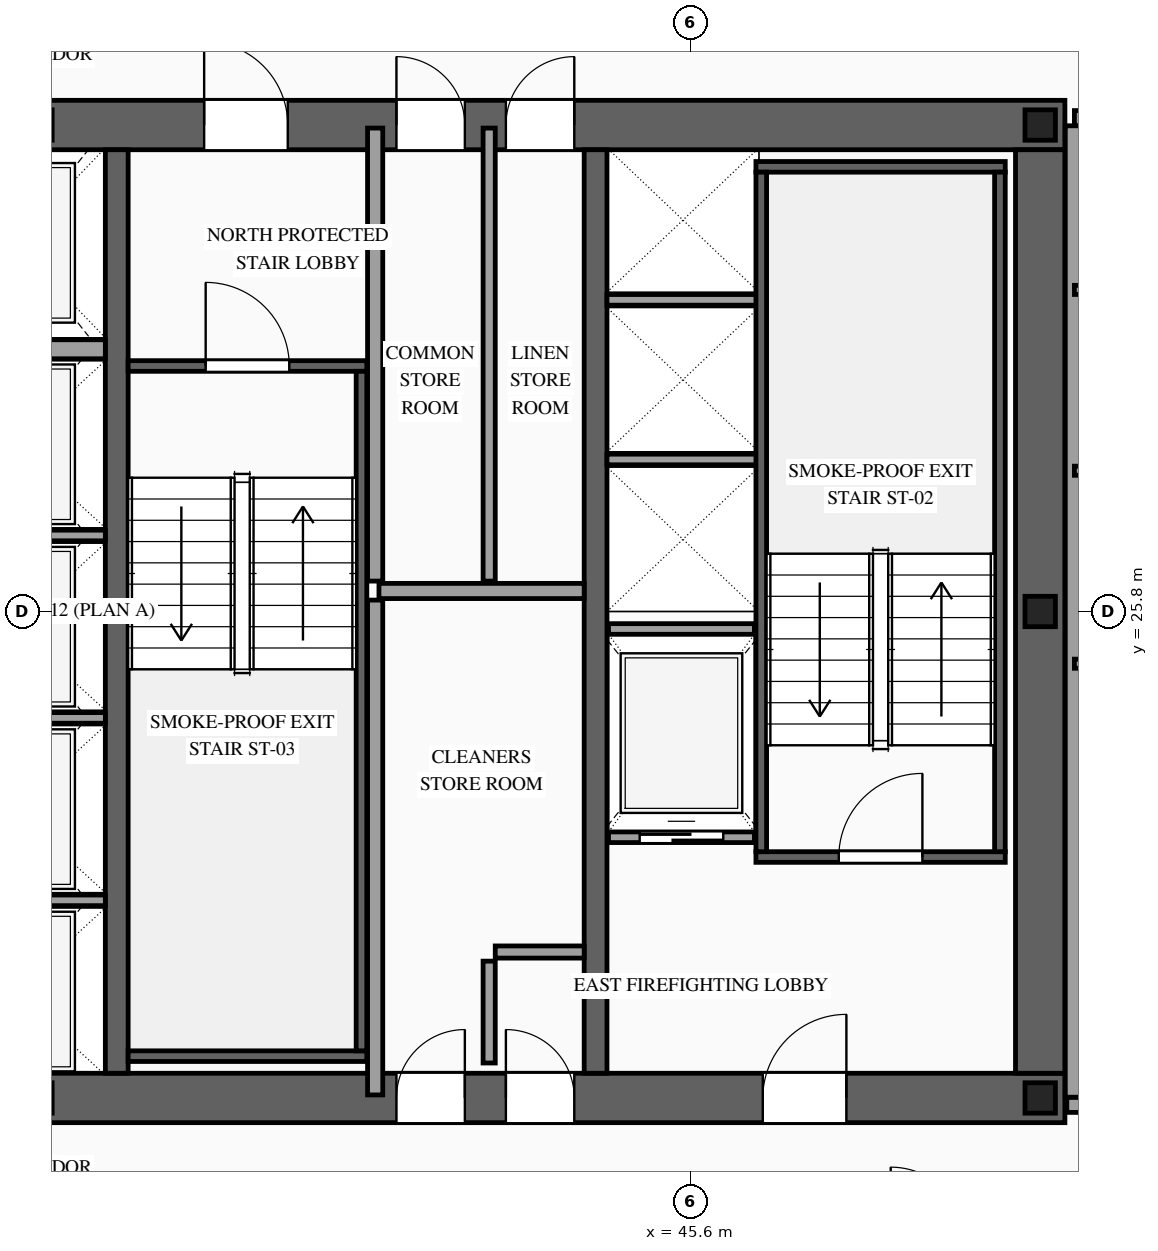
"""IFC4 building model, lengths in metres.
Left out: names, types, materials, properties, quantities, classifications, styles, units other than length and angle.
Written with IfcOpenShell. Run it as: python <this file> out.ifc"""

import sys

from ifc_helpers import new_model, si_unit, direction, frame, frame_2d, origin, origin_2d, place, context, subcontext, project, spatial, rectangle, i_section, extrude, source, transform, mapped, element, fill, save


model = new_model("IFC4")
c1 = context("Model", 3, precision=1e-05, world=origin(), true_north=direction((0.0, 1.0)))
c2 = subcontext(c1, "Body", "Model", "MODEL_VIEW")
j1 = project(units=[si_unit("LENGTHUNIT", "METRE"), si_unit("PLANEANGLEUNIT", "RADIAN")], contexts=[c1])
p1 = place(None, origin())
s1 = spatial("IfcSite", under=j1, at=p1, CompositionType="ELEMENT")
p2 = place(p1, origin())
s2 = spatial("IfcBuilding", under=s1, at=p2, CompositionType="ELEMENT")
p3 = place(p2, frame((0.0, 0.0, 195.0)))
s3 = spatial("IfcBuildingStorey", under=s2, at=p3, CompositionType="ELEMENT", Elevation=195.0)
p4 = place(p3, frame((23.475, 19.4, 0.0), z_axis=(0.0, 0.0, 1.0), x_axis=(1.0, 0.0, 0.0)))
e1 = element("IfcWall", 1, at=p4, inside=s3, PredefinedType="SHEAR", context=c2, shape_type="SweptSolid", body=[
    extrude(rectangle(XDim=27.05, YDim=0.65, at=frame_2d((13.525, 0.0))), origin(), (0.0, 0.0, 1.0), 3.5),
])
p5 = place(p4, frame((1.975, 0.0, 0.0)))
e2 = element("IfcOpeningElement", 2, at=p5, cuts=e1, PredefinedType="OPENING", context=c2, shape_type="SweptSolid", body=[
    extrude(rectangle(XDim=1.1, YDim=2.2, at=frame_2d((0.55, 1.1))), frame((0.0, 0.34, 0.0), z_axis=(0.0, -1.0, 0.0), x_axis=(1.0, 0.0, 0.0)), (0.0, 0.0, 1.0), 0.68),
])
p6 = place(p4, frame((9.875, 0.0, 0.0)))
e3 = element("IfcOpeningElement", 3, at=p6, cuts=e1, PredefinedType="OPENING", context=c2, shape_type="SweptSolid", body=[
    extrude(rectangle(XDim=1.1, YDim=2.2, at=frame_2d((0.55, 1.1))), frame((0.0, 0.34, 0.0), z_axis=(0.0, -1.0, 0.0), x_axis=(1.0, 0.0, 0.0)), (0.0, 0.0, 1.0), 0.68),
])
p7 = place(p4, frame((23.075, 0.0, 0.0)))
e4 = element("IfcOpeningElement", 4, at=p7, cuts=e1, PredefinedType="OPENING", context=c2, shape_type="SweptSolid", body=[
    extrude(rectangle(XDim=1.1, YDim=2.2, at=frame_2d((0.55, 1.1))), frame((0.0, 0.34, 0.0), z_axis=(0.0, -1.0, 0.0), x_axis=(1.0, 0.0, 0.0)), (0.0, 0.0, 1.0), 0.68),
])
p8 = place(p4, frame((19.695, 0.0, 0.0)))
e5 = element("IfcOpeningElement", 5, at=p8, cuts=e1, PredefinedType="OPENING", context=c2, shape_type="SweptSolid", body=[
    extrude(rectangle(XDim=0.9, YDim=2.15, at=frame_2d((0.45, 1.075))), frame((0.0, 0.34, 0.0), z_axis=(0.0, -1.0, 0.0), x_axis=(1.0, 0.0, 0.0)), (0.0, 0.0, 1.0), 0.68),
])
p9 = place(p4, frame((18.255, 0.0, 0.0)))
e6 = element("IfcOpeningElement", 6, at=p9, cuts=e1, PredefinedType="OPENING", context=c2, shape_type="SweptSolid", body=[
    extrude(rectangle(XDim=0.9, YDim=2.15, at=frame_2d((0.45, 1.075))), frame((0.0, 0.34, 0.0), z_axis=(0.0, -1.0, 0.0), x_axis=(1.0, 0.0, 0.0)), (0.0, 0.0, 1.0), 0.68),
])
p10 = place(p3, frame((23.475, 32.2, 0.0), z_axis=(0.0, 0.0, 1.0), x_axis=(1.0, 0.0, 0.0)))
e7 = element("IfcWall", 7, at=p10, inside=s3, PredefinedType="SHEAR", context=c2, shape_type="SweptSolid", body=[
    extrude(rectangle(XDim=27.05, YDim=0.65, at=frame_2d((13.525, 0.0))), origin(), (0.0, 0.0, 1.0), 3.5),
])
p11 = place(p10, frame((4.595, 0.0, 0.0)))
e8 = element("IfcOpeningElement", 8, at=p11, cuts=e7, PredefinedType="OPENING", context=c2, shape_type="SweptSolid", body=[
    extrude(rectangle(XDim=0.9, YDim=2.15, at=frame_2d((0.45, 1.075))), frame((0.0, 0.34, 0.0), z_axis=(0.0, -1.0, 0.0), x_axis=(1.0, 0.0, 0.0)), (0.0, 0.0, 1.0), 0.68),
])
p12 = place(p10, frame((9.875, 0.0, 0.0)))
e9 = element("IfcOpeningElement", 9, at=p12, cuts=e7, PredefinedType="OPENING", context=c2, shape_type="SweptSolid", body=[
    extrude(rectangle(XDim=1.1, YDim=2.2, at=frame_2d((0.55, 1.1))), frame((0.0, 0.34, 0.0), z_axis=(0.0, -1.0, 0.0), x_axis=(1.0, 0.0, 0.0)), (0.0, 0.0, 1.0), 0.68),
])
p13 = place(p10, frame((15.725, 0.0, 0.0)))
e10 = element("IfcOpeningElement", 10, at=p13, cuts=e7, PredefinedType="OPENING", context=c2, shape_type="SweptSolid", body=[
    extrude(rectangle(XDim=1.1, YDim=2.2, at=frame_2d((0.55, 1.1))), frame((0.0, 0.34, 0.0), z_axis=(0.0, -1.0, 0.0), x_axis=(1.0, 0.0, 0.0)), (0.0, 0.0, 1.0), 0.68),
])
p14 = place(p10, frame((18.255, 0.0, 0.0)))
e11 = element("IfcOpeningElement", 11, at=p14, cuts=e7, PredefinedType="OPENING", context=c2, shape_type="SweptSolid", body=[
    extrude(rectangle(XDim=0.9, YDim=2.15, at=frame_2d((0.45, 1.075))), frame((0.0, 0.34, 0.0), z_axis=(0.0, -1.0, 0.0), x_axis=(1.0, 0.0, 0.0)), (0.0, 0.0, 1.0), 0.68),
])
p15 = place(p10, frame((19.695, 0.0, 0.0)))
e12 = element("IfcOpeningElement", 12, at=p15, cuts=e7, PredefinedType="OPENING", context=c2, shape_type="SweptSolid", body=[
    extrude(rectangle(XDim=0.9, YDim=2.15, at=frame_2d((0.45, 1.075))), frame((0.0, 0.34, 0.0), z_axis=(0.0, -1.0, 0.0), x_axis=(1.0, 0.0, 0.0)), (0.0, 0.0, 1.0), 0.68),
])
m1 = source(origin(), c2, "Body", "SweptSolid", [
    extrude(rectangle(XDim=12.15, YDim=0.65, at=frame_2d((6.075, 0.0))), origin(), (0.0, 0.0, 1.0), 3.5),
])
p16 = place(p3, frame((50.2, 19.725, 0.0), z_axis=(0.0, 0.0, 1.0), x_axis=(0.0, 1.0, 0.0)))
e13 = element("IfcWall", 13, at=p16, inside=s3, PredefinedType="SHEAR", context=c2, shape_type="MappedRepresentation", body=[
    mapped(m1, transform((0.0, 0.0, 0.0), scale=1.0)),
])
m2 = source(origin(), c2, "Body", "SweptSolid", [
    extrude(rectangle(XDim=12.15, YDim=0.3, at=frame_2d((6.075, 0.0))), origin(), (0.0, 0.0, 1.0), 3.5),
])
for number, where, z_axis, x_axis in (
    (14, (38.05, 19.725, 0.0), (0.0, 0.0, 1.0), (0.0, 1.0, 0.0)),
    (15, (44.35, 19.725, 0.0), (0.0, 0.0, 1.0), (0.0, 1.0, 0.0)),
):
    element("IfcWall", number, at=place(p3, frame(where, z_axis=z_axis, x_axis=x_axis)), inside=s3, PredefinedType="SOLIDWALL", context=c2, shape_type="MappedRepresentation", body=[
        mapped(m2, transform((0.0, 0.0, 0.0), scale=1.0)),
    ])
m3 = source(origin(), c2, "Body", "SweptSolid", [
    extrude(i_section(OverallWidth=0.4, OverallDepth=0.4, WebThickness=0.013, FlangeThickness=0.021, at=origin_2d()), origin(), (0.0, 0.0, 1.0), 3.5),
])
for number, where, z_axis, x_axis in (
    (16, (50.2, 19.4, 0.0), (0.0, 0.0, 1.0), (1.0, 0.0, 0.0)),
    (17, (50.2, 25.8, 0.0), (0.0, 0.0, 1.0), (1.0, 0.0, 0.0)),
    (18, (50.2, 32.2, 0.0), (0.0, 0.0, 1.0), (1.0, 0.0, 0.0)),
):
    element("IfcColumn", number, at=place(p3, frame(where, z_axis=z_axis, x_axis=x_axis)), inside=s3, PredefinedType="COLUMN", context=c2, shape_type="MappedRepresentation", body=[
        mapped(m3, transform((0.0, 0.0, 0.0), scale=1.0)),
    ])
p17 = place(p3, frame((44.52, 22.83, 0.0), z_axis=(0.0, 0.0, 1.0), x_axis=(1.0, 0.0, 0.0)))
e19 = element("IfcWall", 19, at=p17, inside=s3, PredefinedType="SOLIDWALL", context=c2, shape_type="SweptSolid", body=[
    extrude(rectangle(XDim=1.92, YDim=0.14, at=frame_2d((0.96, 0.0))), origin(), (0.0, 0.0, 1.0), 3.28),
])
p18 = place(p17, frame((0.41, 0.0, 0.0)))
e20 = element("IfcOpeningElement", 20, at=p18, cuts=e19, PredefinedType="OPENING", context=c2, shape_type="SweptSolid", body=[
    extrude(rectangle(XDim=1.1, YDim=2.2, at=frame_2d((0.55, 1.1))), frame((0.0, 0.085, 0.0), z_axis=(0.0, -1.0, 0.0), x_axis=(1.0, 0.0, 0.0)), (0.0, 0.0, 1.0), 0.17),
])
m4 = source(origin(), c2, "Body", "SweptSolid", [
    extrude(rectangle(XDim=1.92, YDim=0.14, at=frame_2d((0.96, 0.0))), origin(), (0.0, 0.0, 1.0), 3.28),
])
p19 = place(p3, frame((44.52, 25.57, 0.0), z_axis=(0.0, 0.0, 1.0), x_axis=(1.0, 0.0, 0.0)))
e21 = element("IfcWall", 21, at=p19, inside=s3, PredefinedType="SOLIDWALL", context=c2, shape_type="MappedRepresentation", body=[
    mapped(m4, transform((0.0, 0.0, 0.0), scale=1.0)),
])
m5 = source(origin(), c2, "Body", "SweptSolid", [
    extrude(rectangle(XDim=2.4, YDim=0.14, at=frame_2d((1.2, 0.0))), origin(), (0.0, 0.0, 1.0), 3.28),
])
for number, where, z_axis, x_axis in (
    (22, (35.5, 22.0, 0.0), (0.0, 0.0, 1.0), (1.0, 0.0, 0.0)),
    (23, (35.5, 24.4, 0.0), (0.0, 0.0, 1.0), (1.0, 0.0, 0.0)),
    (24, (35.5, 26.8, 0.0), (0.0, 0.0, 1.0), (1.0, 0.0, 0.0)),
):
    element("IfcWall", number, at=place(p3, frame(where, z_axis=z_axis, x_axis=x_axis)), inside=s3, PredefinedType="SOLIDWALL", context=c2, shape_type="MappedRepresentation", body=[
        mapped(m5, transform((0.0, 0.0, 0.0), scale=1.0)),
    ])
m6 = source(origin(), c2, "Body", "SweptSolid", [
    extrude(rectangle(XDim=2.4, YDim=0.25, at=frame_2d((1.2, 0.0))), origin(), (0.0, 0.0, 1.0), 3.28),
])
p20 = place(p3, frame((35.5, 29.25, 0.0), z_axis=(0.0, 0.0, 1.0), x_axis=(1.0, 0.0, 0.0)))
e25 = element("IfcWall", 25, at=p20, inside=s3, PredefinedType="SOLIDWALL", context=c2, shape_type="MappedRepresentation", body=[
    mapped(m6, transform((0.0, 0.0, 0.0), scale=1.0)),
])
m7 = source(origin(), c2, "Body", "SweptSolid", [
    extrude(rectangle(XDim=2.0, YDim=0.14, at=frame_2d((1.0, 0.0))), origin(), (0.0, 0.0, 1.0), 3.28),
])
for number, where, z_axis, x_axis in (
    (26, (44.5, 27.8, 0.0), (0.0, 0.0, 1.0), (1.0, 0.0, 0.0)),
    (27, (44.5, 29.9, 0.0), (0.0, 0.0, 1.0), (1.0, 0.0, 0.0)),
):
    element("IfcWall", number, at=place(p3, frame(where, z_axis=z_axis, x_axis=x_axis)), inside=s3, PredefinedType="SOLIDWALL", context=c2, shape_type="MappedRepresentation", body=[
        mapped(m7, transform((0.0, 0.0, 0.0), scale=1.0)),
    ])
p21 = place(p3, frame((46.46, 22.57, 0.0), z_axis=(0.0, 0.0, 1.0), x_axis=(1.0, 0.0, 0.0)))
e28 = element("IfcWall", 28, at=p21, inside=s3, PredefinedType="SOLIDWALL", context=c2, shape_type="SweptSolid", body=[
    extrude(rectangle(XDim=3.28, YDim=0.14, at=frame_2d((1.64, 0.0))), origin(), (0.0, 0.0, 1.0), 3.28),
])
p22 = place(p21, frame((1.09, 0.0, 0.0)))
e29 = element("IfcOpeningElement", 29, at=p22, cuts=e28, PredefinedType="OPENING", context=c2, shape_type="SweptSolid", body=[
    extrude(rectangle(XDim=1.1, YDim=2.2, at=frame_2d((0.55, 1.1))), frame((0.0, 0.085, 0.0), z_axis=(0.0, -1.0, 0.0), x_axis=(1.0, 0.0, 0.0)), (0.0, 0.0, 1.0), 0.17),
])
m8 = source(origin(), c2, "Body", "SweptSolid", [
    extrude(rectangle(XDim=3.28, YDim=0.14, at=frame_2d((1.64, 0.0))), origin(), (0.0, 0.0, 1.0), 3.28),
])
p23 = place(p3, frame((46.46, 31.65, 0.0), z_axis=(0.0, 0.0, 1.0), x_axis=(1.0, 0.0, 0.0)))
e30 = element("IfcWall", 30, at=p23, inside=s3, PredefinedType="SOLIDWALL", context=c2, shape_type="MappedRepresentation", body=[
    mapped(m8, transform((0.0, 0.0, 0.0), scale=1.0)),
])
m9 = source(origin(), c2, "Body", "SweptSolid", [
    extrude(rectangle(XDim=8.94, YDim=0.14, at=frame_2d((4.47, 0.0))), origin(), (0.0, 0.0, 1.0), 3.28),
])
for number, where, z_axis, x_axis in (
    (31, (46.53, 22.64, 0.0), (0.0, 0.0, 1.0), (0.0, 1.0, 0.0)),
    (32, (49.67, 22.64, 0.0), (0.0, 0.0, 1.0), (0.0, 1.0, 0.0)),
):
    element("IfcWall", number, at=place(p3, frame(where, z_axis=z_axis, x_axis=x_axis)), inside=s3, PredefinedType="SOLIDWALL", context=c2, shape_type="MappedRepresentation", body=[
        mapped(m9, transform((0.0, 0.0, 0.0), scale=1.0)),
    ])
p24 = place(p3, frame((38.2, 29.03, 0.0), z_axis=(0.0, 0.0, 1.0), x_axis=(1.0, 0.0, 0.0)))
e33 = element("IfcWall", 33, at=p24, inside=s3, PredefinedType="SOLIDWALL", context=c2, shape_type="SweptSolid", body=[
    extrude(rectangle(XDim=3.14, YDim=0.14, at=frame_2d((1.57, 0.0))), origin(), (0.0, 0.0, 1.0), 3.28),
])
p25 = place(p24, frame((1.02, 0.0, 0.0)))
e34 = element("IfcOpeningElement", 34, at=p25, cuts=e33, PredefinedType="OPENING", context=c2, shape_type="SweptSolid", body=[
    extrude(rectangle(XDim=1.1, YDim=2.2, at=frame_2d((0.55, 1.1))), frame((0.0, 0.085, 0.0), z_axis=(0.0, -1.0, 0.0), x_axis=(1.0, 0.0, 0.0)), (0.0, 0.0, 1.0), 0.17),
])
m10 = source(origin(), c2, "Body", "SweptSolid", [
    extrude(rectangle(XDim=3.14, YDim=0.14, at=frame_2d((1.57, 0.0))), origin(), (0.0, 0.0, 1.0), 3.28),
])
p26 = place(p3, frame((38.2, 19.95, 0.0), z_axis=(0.0, 0.0, 1.0), x_axis=(1.0, 0.0, 0.0)))
e35 = element("IfcWall", 35, at=p26, inside=s3, PredefinedType="SOLIDWALL", context=c2, shape_type="MappedRepresentation", body=[
    mapped(m10, transform((0.0, 0.0, 0.0), scale=1.0)),
])
m11 = source(origin(), c2, "Body", "SweptSolid", [
    extrude(rectangle(XDim=8.94, YDim=0.14, at=frame_2d((4.47, 0.0))), origin(), (0.0, 0.0, 1.0), 3.28),
])
p27 = place(p3, frame((41.27, 20.02, 0.0), z_axis=(0.0, 0.0, 1.0), x_axis=(0.0, 1.0, 0.0)))
e36 = element("IfcWall", 36, at=p27, inside=s3, PredefinedType="SOLIDWALL", context=c2, shape_type="MappedRepresentation", body=[
    mapped(m11, transform((0.0, 0.0, 0.0), scale=1.0)),
])
m12 = source(origin(), c2, "Body", "SweptSolid", [
    extrude(rectangle(XDim=1.34, YDim=0.16, at=frame_2d((0.67, 0.0))), origin(), (0.0, 0.0, 1.0), 3.28),
])
p28 = place(p3, frame((42.95, 19.86, 0.0), z_axis=(0.0, 0.0, 1.0), x_axis=(0.0, 1.0, 0.0)))
e37 = element("IfcWall", 37, at=p28, inside=s3, PredefinedType="PARTITIONING", context=c2, shape_type="MappedRepresentation", body=[
    mapped(m12, transform((0.0, 0.0, 0.0), scale=1.0)),
])
m13 = source(origin(), c2, "Body", "SweptSolid", [
    extrude(rectangle(XDim=1.17, YDim=0.16, at=frame_2d((0.585, 0.0))), origin(), (0.0, 0.0, 1.0), 3.28),
])
p29 = place(p3, frame((43.03, 21.32, 0.0), z_axis=(0.0, 0.0, 1.0), x_axis=(1.0, 0.0, 0.0)))
e38 = element("IfcWall", 38, at=p29, inside=s3, PredefinedType="PARTITIONING", context=c2, shape_type="MappedRepresentation", body=[
    mapped(m13, transform((0.0, 0.0, 0.0), scale=1.0)),
])
m14 = source(origin(), c2, "Body", "SweptSolid", [
    extrude(rectangle(XDim=6.51, YDim=0.2, at=frame_2d((3.255, 0.0))), origin(), (0.0, 0.0, 1.0), 3.28),
])
p30 = place(p3, frame((41.45, 19.44, 0.0), z_axis=(0.0, 0.0, 1.0), x_axis=(0.0, 1.0, 0.0)))
e39 = element("IfcWall", 39, at=p30, inside=s3, PredefinedType="PARTITIONING", context=c2, shape_type="MappedRepresentation", body=[
    mapped(m14, transform((0.0, 0.0, 0.0), scale=1.0)),
])
m15 = source(origin(), c2, "Body", "SweptSolid", [
    extrude(rectangle(XDim=2.7, YDim=0.2, at=frame_2d((1.35, 0.0))), origin(), (0.0, 0.0, 1.0), 3.28),
])
p31 = place(p3, frame((41.5, 26.07, 0.0), z_axis=(0.0, 0.0, 1.0), x_axis=(1.0, 0.0, 0.0)))
e40 = element("IfcWall", 40, at=p31, inside=s3, PredefinedType="PARTITIONING", context=c2, shape_type="MappedRepresentation", body=[
    mapped(m15, transform((0.0, 0.0, 0.0), scale=1.0)),
])
m16 = source(origin(), c2, "Body", "SweptSolid", [
    extrude(rectangle(XDim=5.96, YDim=0.2, at=frame_2d((2.98, 0.0))), origin(), (0.0, 0.0, 1.0), 3.28),
])
p32 = place(p3, frame((41.45, 26.2, 0.0), z_axis=(0.0, 0.0, 1.0), x_axis=(0.0, 1.0, 0.0)))
e41 = element("IfcWall", 41, at=p32, inside=s3, PredefinedType="PARTITIONING", context=c2, shape_type="MappedRepresentation", body=[
    mapped(m16, transform((0.0, 0.0, 0.0), scale=1.0)),
])
m17 = source(origin(), c2, "Body", "SweptSolid", [
    extrude(rectangle(XDim=5.96, YDim=0.16, at=frame_2d((2.98, 0.0))), origin(), (0.0, 0.0, 1.0), 3.28),
])
p33 = place(p3, frame((42.95, 26.2, 0.0), z_axis=(0.0, 0.0, 1.0), x_axis=(0.0, 1.0, 0.0)))
e42 = element("IfcWall", 42, at=p33, inside=s3, PredefinedType="PARTITIONING", context=c2, shape_type="MappedRepresentation", body=[
    mapped(m17, transform((0.0, 0.0, 0.0), scale=1.0)),
])
p34 = place(p3, frame((50.65, 32.29, 0.0), z_axis=(0.0, 0.0, 1.0), x_axis=(1.0, 0.0, 0.0)))
e43 = element("IfcWall", 43, at=p34, inside=s3, PredefinedType="PARTITIONING", context=c2, shape_type="SweptSolid", body=[
    extrude(rectangle(XDim=8.3, YDim=0.2, at=frame_2d((4.15, 0.0))), origin(), (0.0, 0.0, 1.0), 2.775),
])
p35 = place(p34, frame((3.585, 0.0, 0.0)))
e44 = element("IfcOpeningElement", 44, at=p35, cuts=e43, PredefinedType="OPENING", context=c2, shape_type="SweptSolid", body=[
    extrude(rectangle(XDim=1.0, YDim=2.2, at=frame_2d((0.5, 1.1))), frame((0.0, 0.115, 0.0), z_axis=(0.0, -1.0, 0.0), x_axis=(1.0, 0.0, 0.0)), (0.0, 0.0, 1.0), 0.23),
])
m18 = source(origin(), c2, "Body", "SweptSolid", [
    extrude(rectangle(XDim=8.4, YDim=0.2, at=frame_2d((4.2, 0.0))), origin(), (0.0, 0.0, 1.0), 2.775),
])
p36 = place(p3, frame((50.55, 19.31, 0.0), z_axis=(0.0, 0.0, 1.0), x_axis=(1.0, 0.0, 0.0)))
e45 = element("IfcWall", 45, at=p36, inside=s3, PredefinedType="PARTITIONING", context=c2, shape_type="MappedRepresentation", body=[
    mapped(m18, transform((0.0, 0.0, 0.0), scale=1.0)),
])
m19 = source(origin(), c2, "Body", "SweptSolid", [
    extrude(rectangle(XDim=12.78, YDim=0.2, at=frame_2d((6.39, 0.0))), origin(), (0.0, 0.0, 1.0), 3.28),
])
p37 = place(p3, frame((50.63, 19.41, 0.0), z_axis=(0.0, 0.0, 1.0), x_axis=(0.0, 1.0, 0.0)))
e46 = element("IfcWall", 46, at=p37, inside=s3, PredefinedType="PARTITIONING", context=c2, shape_type="MappedRepresentation", body=[
    mapped(m19, transform((0.0, 0.0, 0.0), scale=1.0)),
])
m20 = source(origin(), c2, "Body", "SweptSolid", [
    extrude(rectangle(XDim=2.75, YDim=0.12, at=frame_2d((1.375, 0.0))), origin(), (0.0, 0.0, 1.0), 3.28),
])
for number, where, z_axis, x_axis in (
    (47, (50.65, 25.113, 0.0), (0.0, 0.0, 1.0), (1.0, 0.0, 0.0)),
    (48, (50.65, 27.652, 0.0), (0.0, 0.0, 1.0), (1.0, 0.0, 0.0)),
    (49, (50.65, 30.031, 0.0), (0.0, 0.0, 1.0), (1.0, 0.0, 0.0)),
):
    element("IfcWall", number, at=place(p3, frame(where, z_axis=z_axis, x_axis=x_axis)), inside=s3, PredefinedType="PARTITIONING", context=c2, shape_type="MappedRepresentation", body=[
        mapped(m20, transform((0.0, 0.0, 0.0), scale=1.0)),
    ])
m21 = source(origin(), c2, "Body", "SweptSolid", [
    extrude(rectangle(XDim=1.1, YDim=2.2, at=frame_2d((0.55, 1.1))), frame((0.0, 0.025, 0.0), z_axis=(0.0, -1.0, 0.0), x_axis=(1.0, 0.0, 0.0)), (0.0, 0.0, 1.0), 0.05),
])
p38 = place(p18, origin())
e50 = element("IfcDoor", 50, at=p38, inside=s3, OperationType="SLIDING_TO_RIGHT", PredefinedType="DOOR", context=c2, shape_type="MappedRepresentation", body=[
    mapped(m21, transform((0.0, 0.0, 0.0), scale=1.0)),
])
fill(e20, e50)
m22 = source(origin(), c2, "Body", "SweptSolid", [
    extrude(rectangle(XDim=1.1, YDim=2.2, at=frame_2d((0.55, 1.1))), frame((0.0, 0.025, 0.0), z_axis=(0.0, -1.0, 0.0), x_axis=(1.0, 0.0, 0.0)), (0.0, 0.0, 1.0), 0.05),
])
p39 = place(p22, origin())
e51 = element("IfcDoor", 51, at=p39, inside=s3, OperationType="SINGLE_SWING_RIGHT", PredefinedType="DOOR", context=c2, shape_type="MappedRepresentation", body=[
    mapped(m22, transform((0.0, 0.0, 0.0), scale=1.0)),
])
fill(e29, e51)
p40 = place(p25, origin())
e52 = element("IfcDoor", 52, at=p40, inside=s3, OperationType="SINGLE_SWING_LEFT", PredefinedType="DOOR", context=c2, shape_type="MappedRepresentation", body=[
    mapped(m22, transform((0.0, 0.0, 0.0), scale=1.0)),
])
fill(e34, e52)
p41 = place(p7, origin())
e53 = element("IfcDoor", 53, at=p41, inside=s3, OperationType="SINGLE_SWING_RIGHT", PredefinedType="DOOR", context=c2, shape_type="MappedRepresentation", body=[
    mapped(m22, transform((0.0, 0.0, 0.0), scale=1.0)),
])
fill(e4, e53)
p42 = place(p13, origin())
e54 = element("IfcDoor", 54, at=p42, inside=s3, OperationType="SINGLE_SWING_LEFT", PredefinedType="DOOR", context=c2, shape_type="MappedRepresentation", body=[
    mapped(m22, transform((0.0, 0.0, 0.0), scale=1.0)),
])
fill(e10, e54)
m23 = source(origin(), c2, "Body", "SweptSolid", [
    extrude(rectangle(XDim=0.9, YDim=2.15, at=frame_2d((0.45, 1.075))), frame((0.0, 0.025, 0.0), z_axis=(0.0, -1.0, 0.0), x_axis=(1.0, 0.0, 0.0)), (0.0, 0.0, 1.0), 0.05),
])
p43 = place(p8, origin())
e55 = element("IfcDoor", 55, at=p43, inside=s3, OperationType="SINGLE_SWING_LEFT", PredefinedType="DOOR", context=c2, shape_type="MappedRepresentation", body=[
    mapped(m23, transform((0.0, 0.0, 0.0), scale=1.0)),
])
fill(e5, e55)
p44 = place(p9, origin())
e56 = element("IfcDoor", 56, at=p44, inside=s3, OperationType="SINGLE_SWING_RIGHT", PredefinedType="DOOR", context=c2, shape_type="MappedRepresentation", body=[
    mapped(m23, transform((0.0, 0.0, 0.0), scale=1.0)),
])
fill(e6, e56)
p45 = place(p14, origin())
e57 = element("IfcDoor", 57, at=p45, inside=s3, OperationType="SINGLE_SWING_LEFT", PredefinedType="DOOR", context=c2, shape_type="MappedRepresentation", body=[
    mapped(m23, transform((0.0, 0.0, 0.0), scale=1.0)),
])
fill(e11, e57)
p46 = place(p15, origin())
e58 = element("IfcDoor", 58, at=p46, inside=s3, OperationType="SINGLE_SWING_RIGHT", PredefinedType="DOOR", context=c2, shape_type="MappedRepresentation", body=[
    mapped(m23, transform((0.0, 0.0, 0.0), scale=1.0)),
])
fill(e12, e58)
save(model, sys.argv[1])
